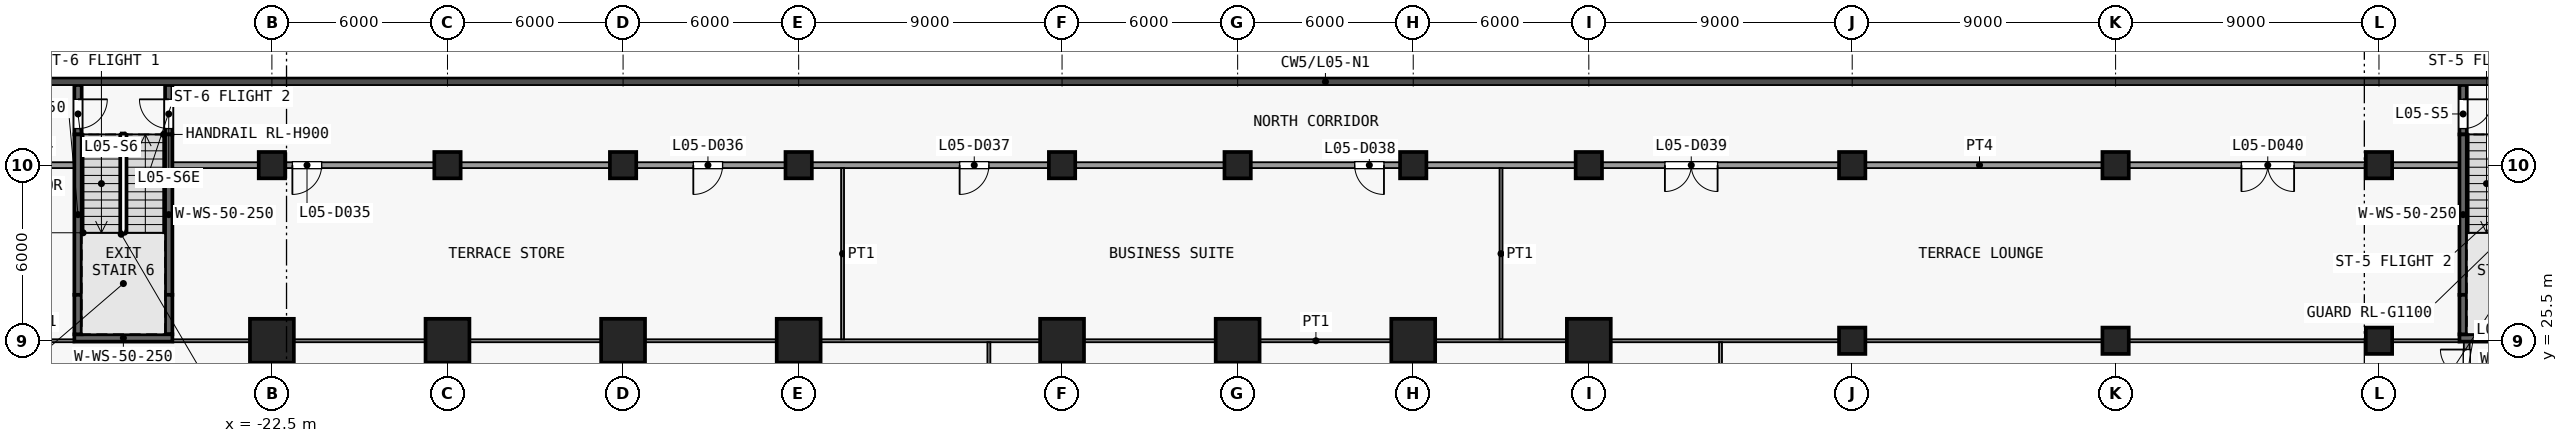
"""IFC4 building model, lengths in metres.
Left out: names, types, materials, properties, quantities, classifications, styles, units other than length and angle.
Written with IfcOpenShell. Run it as: python <this file> out.ifc"""

import sys

from ifc_helpers import new_model, si_unit, direction, frame, frame_2d, origin, origin_2d, place, context, subcontext, project, spatial, rectangle, extrude, element, fill, save


model = new_model("IFC4")
c1 = context("Model", 3, precision=1e-05, world=origin(), true_north=direction((0.0, 1.0)))
c2 = subcontext(c1, "Body", "Model", "MODEL_VIEW")
j1 = project(units=[si_unit("LENGTHUNIT", "METRE"), si_unit("PLANEANGLEUNIT", "RADIAN")], contexts=[c1])
p1 = place(None, origin())
s1 = spatial("IfcSite", under=j1, at=p1, CompositionType="ELEMENT")
p2 = place(p1, origin())
s2 = spatial("IfcBuilding", under=s1, at=p2, CompositionType="ELEMENT")
p3 = place(p2, frame((0.0, 0.0, 28.0)))
s3 = spatial("IfcBuildingStorey", under=s2, at=p3, CompositionType="ELEMENT", Elevation=28.0)
p4 = place(p3, frame((-22.5, 25.5, 0.0), z_axis=(0.0, 0.0, 1.0), x_axis=(1.0, 0.0, 0.0)))
e1 = element("IfcColumn", 1, at=p4, inside=s3, PredefinedType="COLUMN", context=c2, shape_type="SweptSolid", body=[
    extrude(rectangle(XDim=1.5, YDim=1.5, at=origin_2d()), origin(), (0.0, 0.0, 1.0), 4.5),
])
p5 = place(p3, frame((-22.5, 31.5, 0.0), z_axis=(0.0, 0.0, 1.0), x_axis=(1.0, 0.0, 0.0)))
e2 = element("IfcColumn", 2, at=p5, inside=s3, PredefinedType="COLUMN", context=c2, shape_type="SweptSolid", body=[
    extrude(rectangle(XDim=0.9, YDim=0.9, at=origin_2d()), origin(), (0.0, 0.0, 1.0), 4.5),
])
p6 = place(p3, frame((-16.5, 25.5, 0.0), z_axis=(0.0, 0.0, 1.0), x_axis=(1.0, 0.0, 0.0)))
e3 = element("IfcColumn", 3, at=p6, inside=s3, PredefinedType="COLUMN", context=c2, shape_type="SweptSolid", body=[
    extrude(rectangle(XDim=1.5, YDim=1.5, at=origin_2d()), origin(), (0.0, 0.0, 1.0), 4.5),
])
p7 = place(p3, frame((-16.5, 31.5, 0.0), z_axis=(0.0, 0.0, 1.0), x_axis=(1.0, 0.0, 0.0)))
e4 = element("IfcColumn", 4, at=p7, inside=s3, PredefinedType="COLUMN", context=c2, shape_type="SweptSolid", body=[
    extrude(rectangle(XDim=0.9, YDim=0.9, at=origin_2d()), origin(), (0.0, 0.0, 1.0), 4.5),
])
p8 = place(p3, frame((-10.5, 25.5, 0.0), z_axis=(0.0, 0.0, 1.0), x_axis=(1.0, 0.0, 0.0)))
e5 = element("IfcColumn", 5, at=p8, inside=s3, PredefinedType="COLUMN", context=c2, shape_type="SweptSolid", body=[
    extrude(rectangle(XDim=1.5, YDim=1.5, at=origin_2d()), origin(), (0.0, 0.0, 1.0), 4.5),
])
p9 = place(p3, frame((-10.5, 31.5, 0.0), z_axis=(0.0, 0.0, 1.0), x_axis=(1.0, 0.0, 0.0)))
e6 = element("IfcColumn", 6, at=p9, inside=s3, PredefinedType="COLUMN", context=c2, shape_type="SweptSolid", body=[
    extrude(rectangle(XDim=0.9, YDim=0.9, at=origin_2d()), origin(), (0.0, 0.0, 1.0), 4.5),
])
p10 = place(p3, frame((-4.5, 25.5, 0.0), z_axis=(0.0, 0.0, 1.0), x_axis=(1.0, 0.0, 0.0)))
e7 = element("IfcColumn", 7, at=p10, inside=s3, PredefinedType="COLUMN", context=c2, shape_type="SweptSolid", body=[
    extrude(rectangle(XDim=1.5, YDim=1.5, at=origin_2d()), origin(), (0.0, 0.0, 1.0), 4.5),
])
p11 = place(p3, frame((-4.5, 31.5, 0.0), z_axis=(0.0, 0.0, 1.0), x_axis=(1.0, 0.0, 0.0)))
e8 = element("IfcColumn", 8, at=p11, inside=s3, PredefinedType="COLUMN", context=c2, shape_type="SweptSolid", body=[
    extrude(rectangle(XDim=0.9, YDim=0.9, at=origin_2d()), origin(), (0.0, 0.0, 1.0), 4.5),
])
p12 = place(p3, frame((4.5, 25.5, 0.0), z_axis=(0.0, 0.0, 1.0), x_axis=(1.0, 0.0, 0.0)))
e9 = element("IfcColumn", 9, at=p12, inside=s3, PredefinedType="COLUMN", context=c2, shape_type="SweptSolid", body=[
    extrude(rectangle(XDim=1.5, YDim=1.5, at=origin_2d()), origin(), (0.0, 0.0, 1.0), 4.5),
])
p13 = place(p3, frame((4.5, 31.5, 0.0), z_axis=(0.0, 0.0, 1.0), x_axis=(1.0, 0.0, 0.0)))
e10 = element("IfcColumn", 10, at=p13, inside=s3, PredefinedType="COLUMN", context=c2, shape_type="SweptSolid", body=[
    extrude(rectangle(XDim=0.9, YDim=0.9, at=origin_2d()), origin(), (0.0, 0.0, 1.0), 4.5),
])
p14 = place(p3, frame((10.5, 25.5, 0.0), z_axis=(0.0, 0.0, 1.0), x_axis=(1.0, 0.0, 0.0)))
e11 = element("IfcColumn", 11, at=p14, inside=s3, PredefinedType="COLUMN", context=c2, shape_type="SweptSolid", body=[
    extrude(rectangle(XDim=1.5, YDim=1.5, at=origin_2d()), origin(), (0.0, 0.0, 1.0), 4.5),
])
p15 = place(p3, frame((10.5, 31.5, 0.0), z_axis=(0.0, 0.0, 1.0), x_axis=(1.0, 0.0, 0.0)))
e12 = element("IfcColumn", 12, at=p15, inside=s3, PredefinedType="COLUMN", context=c2, shape_type="SweptSolid", body=[
    extrude(rectangle(XDim=0.9, YDim=0.9, at=origin_2d()), origin(), (0.0, 0.0, 1.0), 4.5),
])
p16 = place(p3, frame((16.5, 25.5, 0.0), z_axis=(0.0, 0.0, 1.0), x_axis=(1.0, 0.0, 0.0)))
e13 = element("IfcColumn", 13, at=p16, inside=s3, PredefinedType="COLUMN", context=c2, shape_type="SweptSolid", body=[
    extrude(rectangle(XDim=1.5, YDim=1.5, at=origin_2d()), origin(), (0.0, 0.0, 1.0), 4.5),
])
p17 = place(p3, frame((16.5, 31.5, 0.0), z_axis=(0.0, 0.0, 1.0), x_axis=(1.0, 0.0, 0.0)))
e14 = element("IfcColumn", 14, at=p17, inside=s3, PredefinedType="COLUMN", context=c2, shape_type="SweptSolid", body=[
    extrude(rectangle(XDim=0.9, YDim=0.9, at=origin_2d()), origin(), (0.0, 0.0, 1.0), 4.5),
])
p18 = place(p3, frame((22.5, 25.5, 0.0), z_axis=(0.0, 0.0, 1.0), x_axis=(1.0, 0.0, 0.0)))
e15 = element("IfcColumn", 15, at=p18, inside=s3, PredefinedType="COLUMN", context=c2, shape_type="SweptSolid", body=[
    extrude(rectangle(XDim=1.5, YDim=1.5, at=origin_2d()), origin(), (0.0, 0.0, 1.0), 4.5),
])
for number, where, z_axis, x_axis in (
    (16, (22.5, 31.5, 0.0), (0.0, 0.0, 1.0), (1.0, 0.0, 0.0)),
    (17, (31.5, 25.5, 0.0), (0.0, 0.0, 1.0), (1.0, 0.0, 0.0)),
    (18, (31.5, 31.5, 0.0), (0.0, 0.0, 1.0), (1.0, 0.0, 0.0)),
    (19, (40.5, 25.5, 0.0), (0.0, 0.0, 1.0), (1.0, 0.0, 0.0)),
    (20, (40.5, 31.5, 0.0), (0.0, 0.0, 1.0), (1.0, 0.0, 0.0)),
    (21, (49.5, 25.5, 0.0), (0.0, 0.0, 1.0), (1.0, 0.0, 0.0)),
    (22, (49.5, 31.5, 0.0), (0.0, 0.0, 1.0), (1.0, 0.0, 0.0)),
):
    element("IfcColumn", number, at=place(p3, frame(where, z_axis=z_axis, x_axis=x_axis)), inside=s3, PredefinedType="COLUMN", context=c2, shape_type="SweptSolid", body=[
        extrude(rectangle(XDim=0.9, YDim=0.9, at=origin_2d()), origin(), (0.0, 0.0, 1.0), 4.5),
    ])
p19 = place(p3, frame((52.375, 34.24, 0.0), z_axis=(0.0, 0.0, 1.0), x_axis=(0.0, -1.0, 0.0)))
e23 = element("IfcWall", 23, at=p19, inside=s3, PredefinedType="SHEAR", context=c2, shape_type="SweptSolid", body=[
    extrude(rectangle(XDim=1.69, YDim=0.25, at=frame_2d((0.845, 0.0))), origin(), (0.0, 0.0, 1.0), 4.1),
])
p20 = place(p19, frame((0.49, 0.0, 0.0)))
e24 = element("IfcOpeningElement", 24, at=p20, cuts=e23, PredefinedType="OPENING", context=c2, shape_type="SweptSolid", body=[
    extrude(rectangle(XDim=1.0, YDim=2.1, at=frame_2d((0.5, 1.05))), frame((0.0, 0.135, 0.0), z_axis=(0.0, -1.0, 0.0), x_axis=(1.0, 0.0, 0.0)), (0.0, 0.0, 1.0), 0.27),
])
p21 = place(p3, frame((52.375, 27.07, 0.0), z_axis=(0.0, 0.0, 1.0), x_axis=(0.0, 1.0, 0.0)))
e25 = element("IfcWall", 25, at=p21, inside=s3, PredefinedType="SHEAR", context=c2, shape_type="SweptSolid", body=[
    extrude(rectangle(XDim=5.48, YDim=0.25, at=frame_2d((2.74, 0.0))), origin(), (0.0, 0.0, 1.0), 4.1),
])
p22 = place(p3, frame((52.375, 25.72, 0.0), z_axis=(0.0, 0.0, 1.0), x_axis=(0.0, 1.0, 0.0)))
e26 = element("IfcWall", 26, at=p22, inside=s3, PredefinedType="SHEAR", context=c2, shape_type="SweptSolid", body=[
    extrude(rectangle(XDim=1.35, YDim=0.25, at=frame_2d((0.675, 0.0))), origin(), (0.0, 0.0, 1.0), 4.1),
])
p23 = place(p3, frame((52.25, 25.595, 0.0), z_axis=(0.0, 0.0, 1.0), x_axis=(1.0, 0.0, 0.0)))
e27 = element("IfcWall", 27, at=p23, inside=s3, PredefinedType="SHEAR", context=c2, shape_type="SweptSolid", body=[
    extrude(rectangle(XDim=3.35, YDim=0.25, at=frame_2d((1.675, 0.0))), origin(), (0.0, 0.0, 1.0), 4.1),
])
p24 = place(p3, frame((-29.125, 34.24, 0.0), z_axis=(0.0, 0.0, 1.0), x_axis=(0.0, -1.0, 0.0)))
e28 = element("IfcWall", 28, at=p24, inside=s3, PredefinedType="SHEAR", context=c2, shape_type="SweptSolid", body=[
    extrude(rectangle(XDim=1.69, YDim=0.25, at=frame_2d((0.845, 0.0))), origin(), (0.0, 0.0, 1.0), 4.1),
])
p25 = place(p24, frame((0.49, 0.0, 0.0)))
e29 = element("IfcOpeningElement", 29, at=p25, cuts=e28, PredefinedType="OPENING", context=c2, shape_type="SweptSolid", body=[
    extrude(rectangle(XDim=1.0, YDim=2.1, at=frame_2d((0.5, 1.05))), frame((0.0, 0.135, 0.0), z_axis=(0.0, -1.0, 0.0), x_axis=(1.0, 0.0, 0.0)), (0.0, 0.0, 1.0), 0.27),
])
p26 = place(p3, frame((-29.125, 27.07, 0.0), z_axis=(0.0, 0.0, 1.0), x_axis=(0.0, 1.0, 0.0)))
e30 = element("IfcWall", 30, at=p26, inside=s3, PredefinedType="SHEAR", context=c2, shape_type="SweptSolid", body=[
    extrude(rectangle(XDim=5.48, YDim=0.25, at=frame_2d((2.74, 0.0))), origin(), (0.0, 0.0, 1.0), 4.1),
])
p27 = place(p3, frame((-29.125, 25.72, 0.0), z_axis=(0.0, 0.0, 1.0), x_axis=(0.0, 1.0, 0.0)))
e31 = element("IfcWall", 31, at=p27, inside=s3, PredefinedType="SHEAR", context=c2, shape_type="SweptSolid", body=[
    extrude(rectangle(XDim=1.35, YDim=0.25, at=frame_2d((0.675, 0.0))), origin(), (0.0, 0.0, 1.0), 4.1),
])
p28 = place(p3, frame((-26.025, 32.55, 0.0), z_axis=(0.0, 0.0, 1.0), x_axis=(0.0, 1.0, 0.0)))
e32 = element("IfcWall", 32, at=p28, inside=s3, PredefinedType="SHEAR", context=c2, shape_type="SweptSolid", body=[
    extrude(rectangle(XDim=1.69, YDim=0.25, at=frame_2d((0.845, 0.0))), origin(), (0.0, 0.0, 1.0), 4.1),
])
p29 = place(p28, frame((0.2, 0.0, 0.0)))
e33 = element("IfcOpeningElement", 33, at=p29, cuts=e32, PredefinedType="OPENING", context=c2, shape_type="SweptSolid", body=[
    extrude(rectangle(XDim=1.0, YDim=2.1, at=frame_2d((0.5, 1.05))), frame((0.0, 0.135, 0.0), z_axis=(0.0, -1.0, 0.0), x_axis=(1.0, 0.0, 0.0)), (0.0, 0.0, 1.0), 0.27),
])
p30 = place(p3, frame((-26.025, 27.07, 0.0), z_axis=(0.0, 0.0, 1.0), x_axis=(0.0, 1.0, 0.0)))
e34 = element("IfcWall", 34, at=p30, inside=s3, PredefinedType="SHEAR", context=c2, shape_type="SweptSolid", body=[
    extrude(rectangle(XDim=5.48, YDim=0.25, at=frame_2d((2.74, 0.0))), origin(), (0.0, 0.0, 1.0), 4.1),
])
p31 = place(p3, frame((-26.025, 25.72, 0.0), z_axis=(0.0, 0.0, 1.0), x_axis=(0.0, 1.0, 0.0)))
e35 = element("IfcWall", 35, at=p31, inside=s3, PredefinedType="SHEAR", context=c2, shape_type="SweptSolid", body=[
    extrude(rectangle(XDim=1.35, YDim=0.25, at=frame_2d((0.675, 0.0))), origin(), (0.0, 0.0, 1.0), 4.1),
])
p32 = place(p3, frame((-29.25, 25.595, 0.0), z_axis=(0.0, 0.0, 1.0), x_axis=(1.0, 0.0, 0.0)))
e36 = element("IfcWall", 36, at=p32, inside=s3, PredefinedType="SHEAR", context=c2, shape_type="SweptSolid", body=[
    extrude(rectangle(XDim=3.35, YDim=0.25, at=frame_2d((1.675, 0.0))), origin(), (0.0, 0.0, 1.0), 4.1),
])
p33 = place(p3, frame((-31.4, 25.5, 0.0), z_axis=(0.0, 0.0, 1.0), x_axis=(1.0, 0.0, 0.0)))
e37 = element("IfcWall", 37, at=p33, inside=s3, PredefinedType="PARTITIONING", context=c2, shape_type="SweptSolid", body=[
    extrude(rectangle(XDim=2.15, YDim=0.1, at=frame_2d((1.075, 0.0))), origin(), (0.0, 0.0, 1.0), 4.1),
])
p34 = place(p3, frame((-25.9, 25.5, 0.0), z_axis=(0.0, 0.0, 1.0), x_axis=(1.0, 0.0, 0.0)))
e38 = element("IfcWall", 38, at=p34, inside=s3, PredefinedType="PARTITIONING", context=c2, shape_type="SweptSolid", body=[
    extrude(rectangle(XDim=78.15, YDim=0.1, at=frame_2d((39.075, 0.0))), origin(), (0.0, 0.0, 1.0), 4.1),
])
p35 = place(p3, frame((-31.6, 31.5, 0.0), z_axis=(0.0, 0.0, 1.0), x_axis=(1.0, 0.0, 0.0)))
e39 = element("IfcWall", 39, at=p35, inside=s3, PredefinedType="PARTITIONING", context=c2, shape_type="SweptSolid", body=[
    extrude(rectangle(XDim=2.35, YDim=0.2, at=frame_2d((1.175, 0.0))), origin(), (0.0, 0.0, 1.0), 4.1),
])
p36 = place(p3, frame((-25.9, 31.5, 0.0), z_axis=(0.0, 0.0, 1.0), x_axis=(1.0, 0.0, 0.0)))
e40 = element("IfcWall", 40, at=p36, inside=s3, PredefinedType="PARTITIONING", context=c2, shape_type="SweptSolid", body=[
    extrude(rectangle(XDim=78.15, YDim=0.2, at=frame_2d((39.075, 0.0))), origin(), (0.0, 0.0, 1.0), 4.1),
])
p37 = place(p36, frame((4.1, 0.0, 0.0)))
e41 = element("IfcOpeningElement", 41, at=p37, cuts=e40, PredefinedType="OPENING", context=c2, shape_type="SweptSolid", body=[
    extrude(rectangle(XDim=1.0, YDim=2.1, at=frame_2d((0.5, 1.05))), frame((0.0, 0.11, 0.0), z_axis=(0.0, -1.0, 0.0), x_axis=(1.0, 0.0, 0.0)), (0.0, 0.0, 1.0), 0.22),
])
p38 = place(p36, frame((17.8, 0.0, 0.0)))
e42 = element("IfcOpeningElement", 42, at=p38, cuts=e40, PredefinedType="OPENING", context=c2, shape_type="SweptSolid", body=[
    extrude(rectangle(XDim=1.0, YDim=2.1, at=frame_2d((0.5, 1.05))), frame((0.0, 0.11, 0.0), z_axis=(0.0, -1.0, 0.0), x_axis=(1.0, 0.0, 0.0)), (0.0, 0.0, 1.0), 0.22),
])
p39 = place(p36, frame((26.9, 0.0, 0.0)))
e43 = element("IfcOpeningElement", 43, at=p39, cuts=e40, PredefinedType="OPENING", context=c2, shape_type="SweptSolid", body=[
    extrude(rectangle(XDim=1.0, YDim=2.1, at=frame_2d((0.5, 1.05))), frame((0.0, 0.11, 0.0), z_axis=(0.0, -1.0, 0.0), x_axis=(1.0, 0.0, 0.0)), (0.0, 0.0, 1.0), 0.22),
])
p40 = place(p36, frame((40.4, 0.0, 0.0)))
e44 = element("IfcOpeningElement", 44, at=p40, cuts=e40, PredefinedType="OPENING", context=c2, shape_type="SweptSolid", body=[
    extrude(rectangle(XDim=1.0, YDim=2.1, at=frame_2d((0.5, 1.05))), frame((0.0, 0.11, 0.0), z_axis=(0.0, -1.0, 0.0), x_axis=(1.0, 0.0, 0.0)), (0.0, 0.0, 1.0), 0.22),
])
p41 = place(p36, frame((51.0, 0.0, 0.0)))
e45 = element("IfcOpeningElement", 45, at=p41, cuts=e40, PredefinedType="OPENING", context=c2, shape_type="SweptSolid", body=[
    extrude(rectangle(XDim=1.8, YDim=2.1, at=frame_2d((0.9, 1.05))), frame((0.0, 0.11, 0.0), z_axis=(0.0, -1.0, 0.0), x_axis=(1.0, 0.0, 0.0)), (0.0, 0.0, 1.0), 0.22),
])
p42 = place(p36, frame((70.7, 0.0, 0.0)))
e46 = element("IfcOpeningElement", 46, at=p42, cuts=e40, PredefinedType="OPENING", context=c2, shape_type="SweptSolid", body=[
    extrude(rectangle(XDim=1.8, YDim=2.1, at=frame_2d((0.9, 1.05))), frame((0.0, 0.11, 0.0), z_axis=(0.0, -1.0, 0.0), x_axis=(1.0, 0.0, 0.0)), (0.0, 0.0, 1.0), 0.22),
])
for number, where, z_axis, x_axis in (
    (47, (-3.0, 25.55, 0.0), (0.0, 0.0, 1.0), (0.0, 1.0, 0.0)),
    (48, (2.0, 19.6, 0.0), (0.0, 0.0, 1.0), (0.0, 1.0, 0.0)),
    (49, (19.5, 25.55, 0.0), (0.0, 0.0, 1.0), (0.0, 1.0, 0.0)),
    (50, (27.0, 19.6, 0.0), (0.0, 0.0, 1.0), (0.0, 1.0, 0.0)),
):
    element("IfcWall", number, at=place(p3, frame(where, z_axis=z_axis, x_axis=x_axis)), inside=s3, PredefinedType="PARTITIONING", context=c2, shape_type="SweptSolid", body=[
        extrude(rectangle(XDim=5.85, YDim=0.1, at=frame_2d((2.925, 0.0))), origin(), (0.0, 0.0, 1.0), 4.1),
    ])
p43 = place(p3, frame((52.5, 16.6, 0.0), z_axis=(0.0, 0.0, 1.0), x_axis=(0.0, 1.0, 0.0)))
e51 = element("IfcWall", 51, at=p43, inside=s3, PredefinedType="PARTITIONING", context=c2, shape_type="SweptSolid", body=[
    extrude(rectangle(XDim=8.87, YDim=0.2, at=frame_2d((4.435, 0.0))), origin(), (0.0, 0.0, 1.0), 4.1),
])
p44 = place(p43, frame((0.9, 0.0, 0.0)))
e52 = element("IfcOpeningElement", 52, at=p44, cuts=e51, PredefinedType="OPENING", context=c2, shape_type="SweptSolid", body=[
    extrude(rectangle(XDim=1.0, YDim=2.1, at=frame_2d((0.5, 1.05))), frame((0.0, 0.11, 0.0), z_axis=(0.0, -1.0, 0.0), x_axis=(1.0, 0.0, 0.0)), (0.0, 0.0, 1.0), 0.22),
])
p45 = place(p43, frame((3.2, 0.0, 0.0)))
e53 = element("IfcOpeningElement", 53, at=p45, cuts=e51, PredefinedType="OPENING", context=c2, shape_type="SweptSolid", body=[
    extrude(rectangle(XDim=1.8, YDim=2.1, at=frame_2d((0.9, 1.05))), frame((0.0, 0.11, 0.0), z_axis=(0.0, -1.0, 0.0), x_axis=(1.0, 0.0, 0.0)), (0.0, 0.0, 1.0), 0.22),
])
p46 = place(p43, frame((6.8, 0.0, 0.0)))
e54 = element("IfcOpeningElement", 54, at=p46, cuts=e51, PredefinedType="OPENING", context=c2, shape_type="SweptSolid", body=[
    extrude(rectangle(XDim=1.8, YDim=2.1, at=frame_2d((0.9, 1.05))), frame((0.0, 0.11, 0.0), z_axis=(0.0, -1.0, 0.0), x_axis=(1.0, 0.0, 0.0)), (0.0, 0.0, 1.0), 0.22),
])
p47 = place(p20, origin())
e55 = element("IfcDoor", 55, at=p47, inside=s3, OperationType="SINGLE_SWING_LEFT", PredefinedType="DOOR", context=c2, shape_type="SweptSolid", body=[
    extrude(rectangle(XDim=1.0, YDim=2.1, at=frame_2d((0.5, 1.05))), frame((0.0, 0.025, 0.0), z_axis=(0.0, -1.0, 0.0), x_axis=(1.0, 0.0, 0.0)), (0.0, 0.0, 1.0), 0.05),
])
fill(e24, e55)
p48 = place(p25, origin())
e56 = element("IfcDoor", 56, at=p48, inside=s3, OperationType="SINGLE_SWING_LEFT", PredefinedType="DOOR", context=c2, shape_type="SweptSolid", body=[
    extrude(rectangle(XDim=1.0, YDim=2.1, at=frame_2d((0.5, 1.05))), frame((0.0, 0.025, 0.0), z_axis=(0.0, -1.0, 0.0), x_axis=(1.0, 0.0, 0.0)), (0.0, 0.0, 1.0), 0.05),
])
fill(e29, e56)
p49 = place(p29, origin())
e57 = element("IfcDoor", 57, at=p49, inside=s3, OperationType="SINGLE_SWING_RIGHT", PredefinedType="DOOR", context=c2, shape_type="SweptSolid", body=[
    extrude(rectangle(XDim=1.0, YDim=2.1, at=frame_2d((0.5, 1.05))), frame((0.0, 0.025, 0.0), z_axis=(0.0, -1.0, 0.0), x_axis=(1.0, 0.0, 0.0)), (0.0, 0.0, 1.0), 0.05),
])
fill(e33, e57)
p50 = place(p37, origin())
e58 = element("IfcDoor", 58, at=p50, inside=s3, OperationType="SINGLE_SWING_LEFT", PredefinedType="DOOR", context=c2, shape_type="SweptSolid", body=[
    extrude(rectangle(XDim=1.0, YDim=2.1, at=frame_2d((0.5, 1.05))), frame((0.0, 0.025, 0.0), z_axis=(0.0, -1.0, 0.0), x_axis=(1.0, 0.0, 0.0)), (0.0, 0.0, 1.0), 0.05),
])
fill(e41, e58)
p51 = place(p38, origin())
e59 = element("IfcDoor", 59, at=p51, inside=s3, OperationType="SINGLE_SWING_LEFT", PredefinedType="DOOR", context=c2, shape_type="SweptSolid", body=[
    extrude(rectangle(XDim=1.0, YDim=2.1, at=frame_2d((0.5, 1.05))), frame((0.0, 0.025, 0.0), z_axis=(0.0, -1.0, 0.0), x_axis=(1.0, 0.0, 0.0)), (0.0, 0.0, 1.0), 0.05),
])
fill(e42, e59)
p52 = place(p39, origin())
e60 = element("IfcDoor", 60, at=p52, inside=s3, OperationType="SINGLE_SWING_LEFT", PredefinedType="DOOR", context=c2, shape_type="SweptSolid", body=[
    extrude(rectangle(XDim=1.0, YDim=2.1, at=frame_2d((0.5, 1.05))), frame((0.0, 0.025, 0.0), z_axis=(0.0, -1.0, 0.0), x_axis=(1.0, 0.0, 0.0)), (0.0, 0.0, 1.0), 0.05),
])
fill(e43, e60)
p53 = place(p40, origin())
e61 = element("IfcDoor", 61, at=p53, inside=s3, OperationType="SINGLE_SWING_RIGHT", PredefinedType="DOOR", context=c2, shape_type="SweptSolid", body=[
    extrude(rectangle(XDim=1.0, YDim=2.1, at=frame_2d((0.5, 1.05))), frame((0.0, 0.025, 0.0), z_axis=(0.0, -1.0, 0.0), x_axis=(1.0, 0.0, 0.0)), (0.0, 0.0, 1.0), 0.05),
])
fill(e44, e61)
p54 = place(p41, origin())
e62 = element("IfcDoor", 62, at=p54, inside=s3, OperationType="DOUBLE_DOOR_SINGLE_SWING", PredefinedType="DOOR", context=c2, shape_type="SweptSolid", body=[
    extrude(rectangle(XDim=1.8, YDim=2.1, at=frame_2d((0.9, 1.05))), frame((0.0, 0.025, 0.0), z_axis=(0.0, -1.0, 0.0), x_axis=(1.0, 0.0, 0.0)), (0.0, 0.0, 1.0), 0.05),
])
fill(e45, e62)
p55 = place(p42, origin())
e63 = element("IfcDoor", 63, at=p55, inside=s3, OperationType="DOUBLE_DOOR_SINGLE_SWING", PredefinedType="DOOR", context=c2, shape_type="SweptSolid", body=[
    extrude(rectangle(XDim=1.8, YDim=2.1, at=frame_2d((0.9, 1.05))), frame((0.0, 0.025, 0.0), z_axis=(0.0, -1.0, 0.0), x_axis=(1.0, 0.0, 0.0)), (0.0, 0.0, 1.0), 0.05),
])
fill(e46, e63)
p56 = place(p46, origin())
e64 = element("IfcDoor", 64, at=p56, inside=s3, OperationType="DOUBLE_DOOR_SINGLE_SWING", PredefinedType="DOOR", context=c2, shape_type="SweptSolid", body=[
    extrude(rectangle(XDim=1.8, YDim=2.1, at=frame_2d((0.9, 1.05))), frame((0.0, 0.025, 0.0), z_axis=(0.0, -1.0, 0.0), x_axis=(1.0, 0.0, 0.0)), (0.0, 0.0, 1.0), 0.05),
])
fill(e54, e64)
save(model, sys.argv[1])
